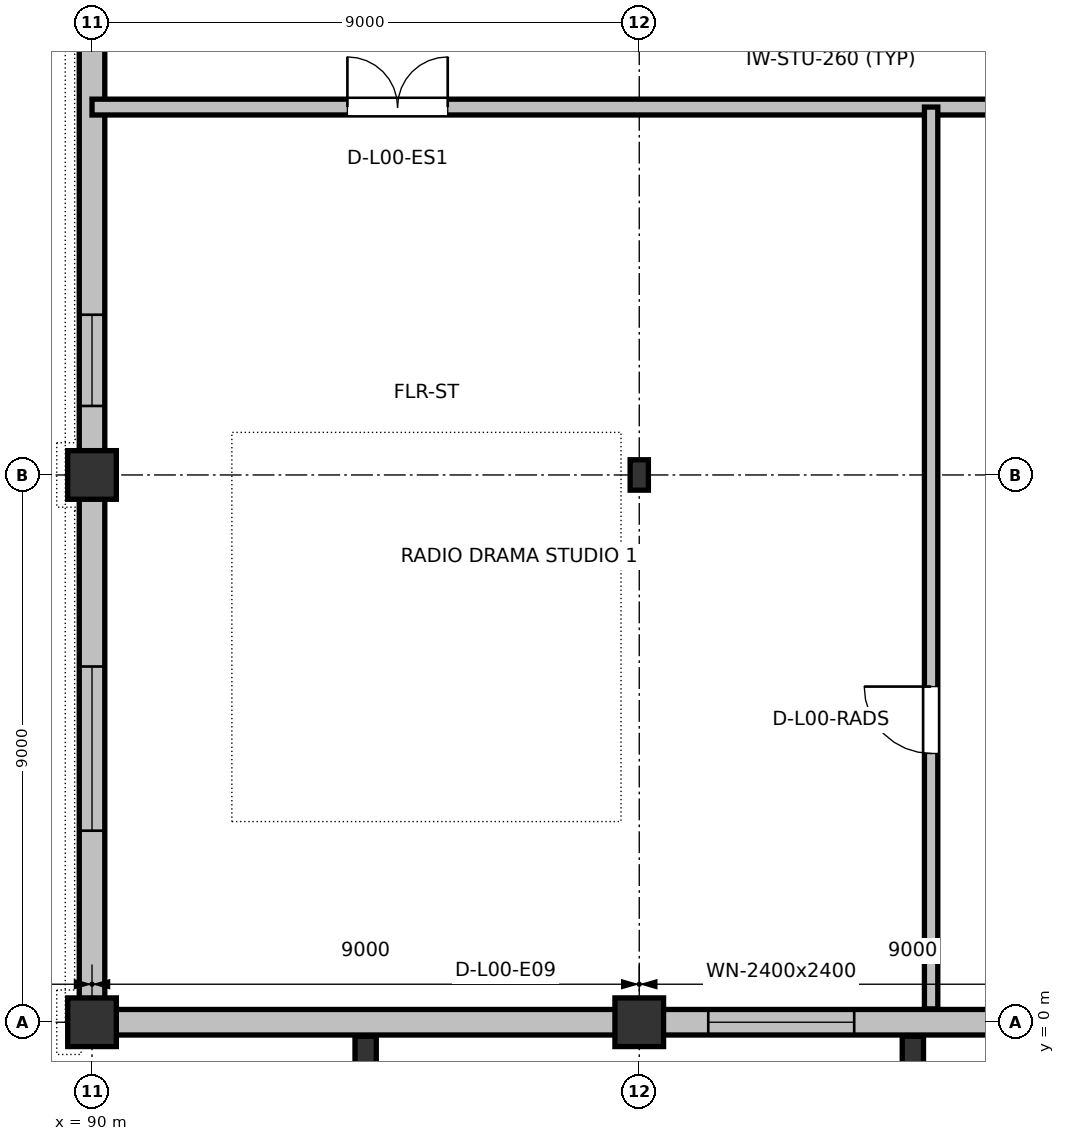
"""IFC4 building model, lengths in metres.
Left out: names, types, materials, properties, quantities, classifications, styles, units other than length and angle.
Written with IfcOpenShell. Run it as: python <this file> out.ifc"""

import sys

from ifc_helpers import new_model, si_unit, direction, frame, frame_2d, origin, origin_2d, place, context, subcontext, project, spatial, rectangle, i_section, extrude, element, fill, save


model = new_model("IFC4")
c1 = context("Model", 3, precision=1e-05, world=origin(), true_north=direction((0.0, 1.0)))
c2 = subcontext(c1, "Body", "Model", "MODEL_VIEW")
j1 = project(units=[si_unit("LENGTHUNIT", "METRE"), si_unit("PLANEANGLEUNIT", "RADIAN")], contexts=[c1])
p1 = place(None, origin())
s1 = spatial("IfcSite", under=j1, at=p1, CompositionType="ELEMENT")
p2 = place(p1, origin())
s2 = spatial("IfcBuilding", under=s1, at=p2, CompositionType="ELEMENT")
p3 = place(p2, origin())
s3 = spatial("IfcBuildingStorey", under=s2, at=p3, CompositionType="ELEMENT", Elevation=0.0)
for number, where, z_axis, x_axis in (
    (1, (94.5, -0.48, 0.0), (0.0, 0.0, 1.0), (1.0, 0.0, 0.0)),
    (2, (103.5, -0.48, 0.0), (0.0, 0.0, 1.0), (1.0, 0.0, 0.0)),
):
    element("IfcColumn", number, at=place(p3, frame(where, z_axis=z_axis, x_axis=x_axis)), inside=s3, PredefinedType="PILASTER", context=c2, shape_type="SweptSolid", body=[
        extrude(rectangle(XDim=0.35, YDim=0.5, at=origin_2d()), origin(), (0.0, 0.0, 1.0), 5.4),
    ])
for number, where, z_axis, x_axis in (
    (3, (90.0, 0.0, 0.0), (0.0, 0.0, 1.0), (1.0, 0.0, 0.0)),
    (4, (90.0, 9.0, 0.0), (0.0, 0.0, 1.0), (1.0, 0.0, 0.0)),
    (5, (99.0, 0.0, 0.0), (0.0, 0.0, 1.0), (1.0, 0.0, 0.0)),
):
    element("IfcColumn", number, at=place(p3, frame(where, z_axis=z_axis, x_axis=x_axis)), inside=s3, PredefinedType="COLUMN", context=c2, shape_type="SweptSolid", body=[
        extrude(rectangle(XDim=0.8, YDim=0.8, at=origin_2d()), origin(), (0.0, 0.0, 1.0), 5.4),
    ])
p4 = place(p3, frame((99.0, 9.0, 0.0), z_axis=(0.0, 0.0, 1.0), x_axis=(1.0, 0.0, 0.0)))
e6 = element("IfcColumn", 6, at=p4, inside=s3, PredefinedType="COLUMN", context=c2, shape_type="SweptSolid", body=[
    extrude(i_section(OverallWidth=0.3, OverallDepth=0.5, WebThickness=0.014, FlangeThickness=0.028, at=origin_2d()), origin(), (0.0, 0.0, 1.0), 5.4),
])
p5 = place(p3, frame((90.0, 8.615, 0.0), z_axis=(0.0, 0.0, 1.0), x_axis=(0.0, -1.0, 0.0)))
e7 = element("IfcWall", 7, at=p5, inside=s3, PredefinedType="STANDARD", context=c2, shape_type="SweptSolid", body=[
    extrude(rectangle(XDim=8.23, YDim=0.42, at=frame_2d((4.115, 0.0))), origin(), (0.0, 0.0, 1.0), 4.795),
])
p6 = place(p5, frame((2.765, 0.0, 0.9)))
e8 = element("IfcOpeningElement", 8, at=p6, cuts=e7, PredefinedType="OPENING", context=c2, shape_type="SweptSolid", body=[
    extrude(rectangle(XDim=2.7, YDim=1.85, at=frame_2d((1.35, 0.925))), frame((0.0, 0.22, 0.0), z_axis=(0.0, -1.0, 0.0), x_axis=(1.0, 0.0, 0.0)), (0.0, 0.0, 1.0), 0.44),
])
p7 = place(p3, frame((90.0, 17.615, 0.0), z_axis=(0.0, 0.0, 1.0), x_axis=(0.0, -1.0, 0.0)))
e9 = element("IfcWall", 9, at=p7, inside=s3, PredefinedType="STANDARD", context=c2, shape_type="SweptSolid", body=[
    extrude(rectangle(XDim=8.23, YDim=0.42, at=frame_2d((4.115, 0.0))), origin(), (0.0, 0.0, 1.0), 4.795),
])
p8 = place(p7, frame((5.98, 0.0, 0.9)))
e10 = element("IfcOpeningElement", 10, at=p8, cuts=e9, PredefinedType="OPENING", context=c2, shape_type="SweptSolid", body=[
    extrude(rectangle(XDim=1.5, YDim=2.2, at=frame_2d((0.75, 1.1))), frame((0.0, 0.22, 0.0), z_axis=(0.0, -1.0, 0.0), x_axis=(1.0, 0.0, 0.0)), (0.0, 0.0, 1.0), 0.44),
])
p9 = place(p3, frame((90.385, 0.0, 0.0), z_axis=(0.0, 0.0, 1.0), x_axis=(1.0, 0.0, 0.0)))
e11 = element("IfcWall", 11, at=p9, inside=s3, PredefinedType="STANDARD", context=c2, shape_type="SweptSolid", body=[
    extrude(rectangle(XDim=8.23, YDim=0.42, at=frame_2d((4.115, 0.0))), origin(), (0.0, 0.0, 1.0), 4.795),
])
p10 = place(p9, frame((5.515, 0.0, 0.0)))
e12 = element("IfcOpeningElement", 12, at=p10, cuts=e11, PredefinedType="OPENING", context=c2, shape_type="SweptSolid", body=[
    extrude(rectangle(XDim=1.8, YDim=2.4, at=frame_2d((0.9, 1.2))), frame((0.0, 0.22, 0.0), z_axis=(0.0, -1.0, 0.0), x_axis=(1.0, 0.0, 0.0)), (0.0, 0.0, 1.0), 0.44),
])
p11 = place(p3, frame((99.385, 0.0, 0.0), z_axis=(0.0, 0.0, 1.0), x_axis=(1.0, 0.0, 0.0)))
e13 = element("IfcWall", 13, at=p11, inside=s3, PredefinedType="STANDARD", context=c2, shape_type="SweptSolid", body=[
    extrude(rectangle(XDim=8.23, YDim=0.42, at=frame_2d((4.115, 0.0))), origin(), (0.0, 0.0, 1.0), 4.795),
])
p12 = place(p11, frame((0.75, 0.0, 0.9)))
e14 = element("IfcOpeningElement", 14, at=p12, cuts=e13, PredefinedType="OPENING", context=c2, shape_type="SweptSolid", body=[
    extrude(rectangle(XDim=2.4, YDim=2.4, at=frame_2d((1.2, 1.2))), frame((0.0, 0.22, 0.0), z_axis=(0.0, -1.0, 0.0), x_axis=(1.0, 0.0, 0.0)), (0.0, 0.0, 1.0), 0.44),
])
p13 = place(p3, frame((90.0, 15.05, 0.0), z_axis=(0.0, 0.0, 1.0), x_axis=(1.0, 0.0, 0.0)))
e15 = element("IfcWall", 15, at=p13, inside=s3, PredefinedType="PARTITIONING", context=c2, shape_type="SweptSolid", body=[
    extrude(rectangle(XDim=24.3, YDim=0.26, at=frame_2d((12.15, 0.0))), origin(), (0.0, 0.0, 1.0), 4.745),
])
p14 = place(p13, frame((4.2, 0.0, 0.0)))
e16 = element("IfcOpeningElement", 16, at=p14, cuts=e15, PredefinedType="OPENING", context=c2, shape_type="SweptSolid", body=[
    extrude(rectangle(XDim=1.65, YDim=2.25, at=frame_2d((0.825, 1.125))), frame((0.0, 0.14, 0.0), z_axis=(0.0, -1.0, 0.0), x_axis=(1.0, 0.0, 0.0)), (0.0, 0.0, 1.0), 0.28),
])
p15 = place(p13, frame((16.5, 0.0, 0.0)))
e17 = element("IfcOpeningElement", 17, at=p15, cuts=e15, PredefinedType="OPENING", context=c2, shape_type="SweptSolid", body=[
    extrude(rectangle(XDim=1.45, YDim=2.22, at=frame_2d((0.725, 1.11))), frame((0.0, 0.14, 0.0), z_axis=(0.0, -1.0, 0.0), x_axis=(1.0, 0.0, 0.0)), (0.0, 0.0, 1.0), 0.28),
])
p16 = place(p3, frame((103.8, 0.22, 0.0), z_axis=(0.0, 0.0, 1.0), x_axis=(0.0, 1.0, 0.0)))
e18 = element("IfcWall", 18, at=p16, inside=s3, PredefinedType="PARTITIONING", context=c2, shape_type="SweptSolid", body=[
    extrude(rectangle(XDim=14.83, YDim=0.22, at=frame_2d((7.415, 0.0))), origin(), (0.0, 0.0, 1.0), 5.16),
])
p17 = place(p16, frame((4.2, 0.0, 0.0)))
e19 = element("IfcOpeningElement", 19, at=p17, cuts=e18, PredefinedType="OPENING", context=c2, shape_type="SweptSolid", body=[
    extrude(rectangle(XDim=1.1, YDim=2.16, at=frame_2d((0.55, 1.08))), frame((0.0, 0.12, 0.0), z_axis=(0.0, -1.0, 0.0), x_axis=(1.0, 0.0, 0.0)), (0.0, 0.0, 1.0), 0.24),
])
p18 = place(p10, frame((1.8, 0.0, 0.0), z_axis=(0.0, 0.0, 1.0), x_axis=(-1.0, 0.0, 0.0)))
e20 = element("IfcDoor", 20, at=p18, inside=s3, OperationType="DOUBLE_DOOR_SINGLE_SWING", PredefinedType="DOOR", context=c2, shape_type="SweptSolid", body=[
    extrude(rectangle(XDim=1.8, YDim=2.4, at=frame_2d((0.9, 1.2))), frame((0.0, 0.025, 0.0), z_axis=(0.0, -1.0, 0.0), x_axis=(1.0, 0.0, 0.0)), (0.0, 0.0, 1.0), 0.05),
])
fill(e12, e20)
p19 = place(p6, origin())
e21 = element("IfcWindow", 21, at=p19, inside=s3, PartitioningType="SINGLE_PANEL", PredefinedType="WINDOW", context=c2, shape_type="SweptSolid", body=[
    extrude(rectangle(XDim=2.7, YDim=1.85, at=frame_2d((1.35, 0.925))), frame((0.0, 0.03, 0.0), z_axis=(0.0, -1.0, 0.0), x_axis=(1.0, 0.0, 0.0)), (0.0, 0.0, 1.0), 0.06),
])
fill(e8, e21)
p20 = place(p8, origin())
e22 = element("IfcWindow", 22, at=p20, inside=s3, PartitioningType="SINGLE_PANEL", PredefinedType="WINDOW", context=c2, shape_type="SweptSolid", body=[
    extrude(rectangle(XDim=1.5, YDim=2.2, at=frame_2d((0.75, 1.1))), frame((0.0, 0.03, 0.0), z_axis=(0.0, -1.0, 0.0), x_axis=(1.0, 0.0, 0.0)), (0.0, 0.0, 1.0), 0.06),
])
fill(e10, e22)
p21 = place(p12, origin())
e23 = element("IfcWindow", 23, at=p21, inside=s3, PartitioningType="SINGLE_PANEL", PredefinedType="WINDOW", context=c2, shape_type="SweptSolid", body=[
    extrude(rectangle(XDim=2.4, YDim=2.4, at=frame_2d((1.2, 1.2))), frame((0.0, 0.03, 0.0), z_axis=(0.0, -1.0, 0.0), x_axis=(1.0, 0.0, 0.0)), (0.0, 0.0, 1.0), 0.06),
])
fill(e14, e23)
p22 = place(p14, origin())
e24 = element("IfcDoor", 24, at=p22, inside=s3, OperationType="DOUBLE_DOOR_SINGLE_SWING", PredefinedType="DOOR", context=c2, shape_type="SweptSolid", body=[
    extrude(rectangle(XDim=1.65, YDim=2.25, at=frame_2d((0.825, 1.125))), frame((0.0, 0.025, 0.0), z_axis=(0.0, -1.0, 0.0), x_axis=(1.0, 0.0, 0.0)), (0.0, 0.0, 1.0), 0.05),
])
fill(e16, e24)
p23 = place(p17, origin())
e25 = element("IfcDoor", 25, at=p23, inside=s3, OperationType="SINGLE_SWING_RIGHT", PredefinedType="DOOR", context=c2, shape_type="SweptSolid", body=[
    extrude(rectangle(XDim=1.1, YDim=2.16, at=frame_2d((0.55, 1.08))), frame((0.0, 0.025, 0.0), z_axis=(0.0, -1.0, 0.0), x_axis=(1.0, 0.0, 0.0)), (0.0, 0.0, 1.0), 0.05),
])
fill(e19, e25)
save(model, sys.argv[1])
